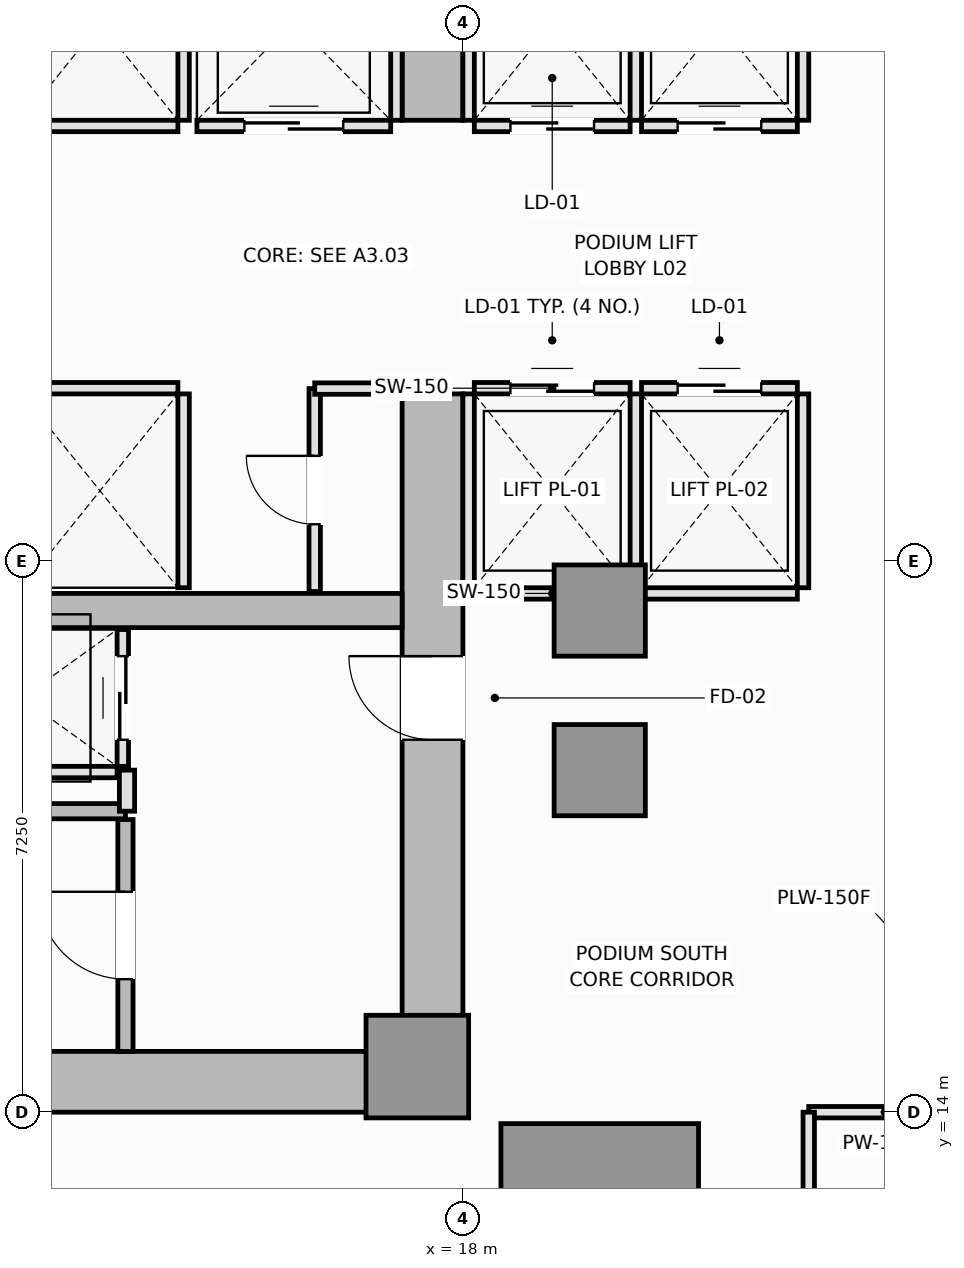
"""IFC4 building model, lengths in metres.
Left out: names, types, materials, properties, quantities, classifications, styles, units other than length and angle.
Written with IfcOpenShell. Run it as: python <this file> out.ifc"""

import sys

from ifc_helpers import new_model, si_unit, direction, frame, frame_2d, origin, origin_2d, place, context, subcontext, project, spatial, rectangle, extrude, element, fill, save


model = new_model("IFC4")
c1 = context("Model", 3, precision=1e-05, world=origin(), true_north=direction((0.0, 1.0)))
c2 = subcontext(c1, "Body", "Model", "MODEL_VIEW")
j1 = project(units=[si_unit("LENGTHUNIT", "METRE"), si_unit("PLANEANGLEUNIT", "RADIAN")], contexts=[c1])
p1 = place(None, origin())
s1 = spatial("IfcSite", under=j1, at=p1, CompositionType="ELEMENT")
p2 = place(p1, origin())
s2 = spatial("IfcBuilding", under=s1, at=p2, CompositionType="ELEMENT")
p3 = place(p2, frame((0.0, 0.0, 10.8)))
s3 = spatial("IfcBuildingStorey", under=s2, at=p3, CompositionType="ELEMENT", Elevation=10.8)
p4 = place(p3, frame((4.5, 14.4, 0.0), z_axis=(0.0, 0.0, 1.0), x_axis=(1.0, 0.0, 0.0)))
e1 = element("IfcWall", 1, at=p4, inside=s3, PredefinedType="SHEAR", context=c2, shape_type="SweptSolid", body=[
    extrude(rectangle(XDim=13.5, YDim=0.8, at=frame_2d((6.75, 0.0))), origin(), (0.0, 0.0, 1.0), 4.8),
])
p5 = place(p3, frame((17.6, 14.8, 0.0), z_axis=(0.0, 0.0, 1.0), x_axis=(0.0, 1.0, 0.0)))
e2 = element("IfcWall", 2, at=p5, inside=s3, PredefinedType="SHEAR", context=c2, shape_type="SweptSolid", body=[
    extrude(rectangle(XDim=8.65, YDim=0.8, at=frame_2d((4.325, 0.0))), origin(), (0.0, 0.0, 1.0), 4.8),
])
p6 = place(p5, frame((4.1, 0.0, 0.0)))
e3 = element("IfcOpeningElement", 3, at=p6, cuts=e2, PredefinedType="OPENING", context=c2, shape_type="SweptSolid", body=[
    extrude(rectangle(XDim=1.1, YDim=2.15, at=frame_2d((0.55, 1.075))), frame((0.0, 0.41, 0.0), z_axis=(0.0, -1.0, 0.0), x_axis=(1.0, 0.0, 0.0)), (0.0, 0.0, 1.0), 0.82),
])
p7 = place(p3, frame((17.6, 27.05, 0.0), z_axis=(0.0, 0.0, 1.0), x_axis=(0.0, 1.0, 0.0)))
e4 = element("IfcWall", 4, at=p7, inside=s3, PredefinedType="SHEAR", context=c2, shape_type="SweptSolid", body=[
    extrude(rectangle(XDim=8.65, YDim=0.8, at=frame_2d((4.325, 0.0))), origin(), (0.0, 0.0, 1.0), 4.8),
])
p8 = place(p7, frame((3.45, 0.0, 0.0)))
e5 = element("IfcOpeningElement", 5, at=p8, cuts=e4, PredefinedType="OPENING", context=c2, shape_type="SweptSolid", body=[
    extrude(rectangle(XDim=1.1, YDim=2.15, at=frame_2d((0.55, 1.075))), frame((0.0, 0.41, 0.0), z_axis=(0.0, -1.0, 0.0), x_axis=(1.0, 0.0, 0.0)), (0.0, 0.0, 1.0), 0.82),
])
p9 = place(p3, frame((5.3, 20.6, 0.0), z_axis=(0.0, 0.0, 1.0), x_axis=(1.0, 0.0, 0.0)))
e6 = element("IfcWall", 6, at=p9, inside=s3, PredefinedType="SHEAR", context=c2, shape_type="SweptSolid", body=[
    extrude(rectangle(XDim=11.9, YDim=0.45, at=frame_2d((5.95, 0.0))), origin(), (0.0, 0.0, 1.0), 4.8),
])
p10 = place(p3, frame((17.4, 14.6, 0.0), z_axis=(0.0, 0.0, 1.0), x_axis=(1.0, 0.0, 0.0)))
e7 = element("IfcColumn", 7, at=p10, inside=s3, PredefinedType="PILASTER", context=c2, shape_type="SweptSolid", body=[
    extrude(rectangle(XDim=1.35, YDim=1.35, at=origin_2d()), origin(), (0.0, 0.0, 1.0), 4.8),
])
p11 = place(p3, frame((19.8, 12.75, 0.0), z_axis=(0.0, 0.0, 1.0), x_axis=(1.0, 0.0, 0.0)))
e8 = element("IfcColumn", 8, at=p11, inside=s3, PredefinedType="COLUMN", context=c2, shape_type="SweptSolid", body=[
    extrude(rectangle(XDim=2.6, YDim=2.2, at=origin_2d()), origin(), (0.0, 0.0, 1.0), 4.8),
])
for number, where, z_axis, x_axis in (
    (9, (19.8, 18.5, 0.0), (0.0, 0.0, 1.0), (1.0, 0.0, 0.0)),
    (10, (19.8, 20.6, 0.0), (0.0, 0.0, 1.0), (1.0, 0.0, 0.0)),
):
    element("IfcColumn", number, at=place(p3, frame(where, z_axis=z_axis, x_axis=x_axis)), inside=s3, PredefinedType="COLUMN", context=c2, shape_type="SweptSolid", body=[
        extrude(rectangle(XDim=1.2, YDim=1.2, at=origin_2d()), origin(), (0.0, 0.0, 1.0), 4.8),
    ])
p12 = place(p3, frame((5.9, 17.96, 0.0), z_axis=(0.0, 0.0, 1.0), x_axis=(1.0, 0.0, 0.0)))
e11 = element("IfcWall", 11, at=p12, inside=s3, PredefinedType="SOLIDWALL", context=c2, shape_type="SweptSolid", body=[
    extrude(rectangle(XDim=7.66, YDim=0.2, at=frame_2d((3.83, 0.0))), origin(), (0.0, 0.0, 1.0), 4.8),
])
p13 = place(p3, frame((13.56, 14.8, 0.0), z_axis=(0.0, 0.0, 1.0), x_axis=(0.0, 1.0, 0.0)))
e12 = element("IfcWall", 12, at=p13, inside=s3, PredefinedType="SOLIDWALL", context=c2, shape_type="SweptSolid", body=[
    extrude(rectangle(XDim=3.05, YDim=0.2, at=frame_2d((1.525, 0.0))), origin(), (0.0, 0.0, 1.0), 4.8),
])
p14 = place(p13, frame((0.95, 0.0, 0.0)))
e13 = element("IfcOpeningElement", 13, at=p14, cuts=e12, PredefinedType="OPENING", context=c2, shape_type="SweptSolid", body=[
    extrude(rectangle(XDim=1.15, YDim=2.15, at=frame_2d((0.575, 1.075))), frame((0.0, 0.11, 0.0), z_axis=(0.0, -1.0, 0.0), x_axis=(1.0, 0.0, 0.0)), (0.0, 0.0, 1.0), 0.22),
])
p15 = place(p3, frame((18.15, 20.825, 0.0), z_axis=(0.0, 0.0, 1.0), x_axis=(1.0, 0.0, 0.0)))
e14 = element("IfcWall", 14, at=p15, inside=s3, PredefinedType="PARTITIONING", context=c2, shape_type="SweptSolid", body=[
    extrude(rectangle(XDim=2.05, YDim=0.15, at=frame_2d((1.025, 0.0))), origin(), (0.0, 0.0, 1.0), 4.6),
])
p16 = place(p3, frame((18.15, 23.525, 0.0), z_axis=(0.0, 0.0, 1.0), x_axis=(1.0, 0.0, 0.0)))
e15 = element("IfcWall", 15, at=p16, inside=s3, PredefinedType="PARTITIONING", context=c2, shape_type="SweptSolid", body=[
    extrude(rectangle(XDim=2.05, YDim=0.15, at=frame_2d((1.025, 0.0))), origin(), (0.0, 0.0, 1.0), 4.6),
])
p17 = place(p16, frame((0.475, 0.0, 0.0)))
e16 = element("IfcOpeningElement", 16, at=p17, cuts=e15, PredefinedType="OPENING", context=c2, shape_type="SweptSolid", body=[
    extrude(rectangle(XDim=1.1, YDim=2.2, at=frame_2d((0.55, 1.1))), frame((0.0, 0.085, 0.0), z_axis=(0.0, -1.0, 0.0), x_axis=(1.0, 0.0, 0.0)), (0.0, 0.0, 1.0), 0.17),
])
for number, where, z_axis, x_axis in (
    (17, (18.075, 20.9, 0.0), (0.0, 0.0, 1.0), (0.0, 1.0, 0.0)),
    (18, (20.275, 20.9, 0.0), (0.0, 0.0, 1.0), (0.0, 1.0, 0.0)),
):
    element("IfcWall", number, at=place(p3, frame(where, z_axis=z_axis, x_axis=x_axis)), inside=s3, PredefinedType="PARTITIONING", context=c2, shape_type="SweptSolid", body=[
        extrude(rectangle(XDim=2.55, YDim=0.15, at=frame_2d((1.275, 0.0))), origin(), (0.0, 0.0, 1.0), 4.6),
    ])
p18 = place(p3, frame((20.35, 20.825, 0.0), z_axis=(0.0, 0.0, 1.0), x_axis=(1.0, 0.0, 0.0)))
e19 = element("IfcWall", 19, at=p18, inside=s3, PredefinedType="PARTITIONING", context=c2, shape_type="SweptSolid", body=[
    extrude(rectangle(XDim=2.05, YDim=0.15, at=frame_2d((1.025, 0.0))), origin(), (0.0, 0.0, 1.0), 4.6),
])
p19 = place(p3, frame((20.35, 23.525, 0.0), z_axis=(0.0, 0.0, 1.0), x_axis=(1.0, 0.0, 0.0)))
e20 = element("IfcWall", 20, at=p19, inside=s3, PredefinedType="PARTITIONING", context=c2, shape_type="SweptSolid", body=[
    extrude(rectangle(XDim=2.05, YDim=0.15, at=frame_2d((1.025, 0.0))), origin(), (0.0, 0.0, 1.0), 4.6),
])
p20 = place(p19, frame((0.475, 0.0, 0.0)))
e21 = element("IfcOpeningElement", 21, at=p20, cuts=e20, PredefinedType="OPENING", context=c2, shape_type="SweptSolid", body=[
    extrude(rectangle(XDim=1.1, YDim=2.2, at=frame_2d((0.55, 1.1))), frame((0.0, 0.085, 0.0), z_axis=(0.0, -1.0, 0.0), x_axis=(1.0, 0.0, 0.0)), (0.0, 0.0, 1.0), 0.17),
])
p21 = place(p3, frame((22.475, 20.9, 0.0), z_axis=(0.0, 0.0, 1.0), x_axis=(0.0, 1.0, 0.0)))
e22 = element("IfcWall", 22, at=p21, inside=s3, PredefinedType="PARTITIONING", context=c2, shape_type="SweptSolid", body=[
    extrude(rectangle(XDim=2.55, YDim=0.15, at=frame_2d((1.275, 0.0))), origin(), (0.0, 0.0, 1.0), 4.6),
])
p22 = place(p3, frame((18.15, 26.975, 0.0), z_axis=(0.0, 0.0, 1.0), x_axis=(1.0, 0.0, 0.0)))
e23 = element("IfcWall", 23, at=p22, inside=s3, PredefinedType="PARTITIONING", context=c2, shape_type="SweptSolid", body=[
    extrude(rectangle(XDim=2.05, YDim=0.15, at=frame_2d((1.025, 0.0))), origin(), (0.0, 0.0, 1.0), 4.6),
])
p23 = place(p22, frame((0.475, 0.0, 0.0)))
e24 = element("IfcOpeningElement", 24, at=p23, cuts=e23, PredefinedType="OPENING", context=c2, shape_type="SweptSolid", body=[
    extrude(rectangle(XDim=1.1, YDim=2.2, at=frame_2d((0.55, 1.1))), frame((0.0, 0.085, 0.0), z_axis=(0.0, -1.0, 0.0), x_axis=(1.0, 0.0, 0.0)), (0.0, 0.0, 1.0), 0.17),
])
for number, where, z_axis, x_axis in (
    (25, (18.075, 27.05, 0.0), (0.0, 0.0, 1.0), (0.0, 1.0, 0.0)),
    (26, (20.275, 27.05, 0.0), (0.0, 0.0, 1.0), (0.0, 1.0, 0.0)),
):
    element("IfcWall", number, at=place(p3, frame(where, z_axis=z_axis, x_axis=x_axis)), inside=s3, PredefinedType="PARTITIONING", context=c2, shape_type="SweptSolid", body=[
        extrude(rectangle(XDim=2.55, YDim=0.15, at=frame_2d((1.275, 0.0))), origin(), (0.0, 0.0, 1.0), 4.6),
    ])
p24 = place(p3, frame((20.35, 26.975, 0.0), z_axis=(0.0, 0.0, 1.0), x_axis=(1.0, 0.0, 0.0)))
e27 = element("IfcWall", 27, at=p24, inside=s3, PredefinedType="PARTITIONING", context=c2, shape_type="SweptSolid", body=[
    extrude(rectangle(XDim=2.05, YDim=0.15, at=frame_2d((1.025, 0.0))), origin(), (0.0, 0.0, 1.0), 4.6),
])
p25 = place(p24, frame((0.475, 0.0, 0.0)))
e28 = element("IfcOpeningElement", 28, at=p25, cuts=e27, PredefinedType="OPENING", context=c2, shape_type="SweptSolid", body=[
    extrude(rectangle(XDim=1.1, YDim=2.2, at=frame_2d((0.55, 1.1))), frame((0.0, 0.085, 0.0), z_axis=(0.0, -1.0, 0.0), x_axis=(1.0, 0.0, 0.0)), (0.0, 0.0, 1.0), 0.17),
])
p26 = place(p3, frame((22.475, 27.05, 0.0), z_axis=(0.0, 0.0, 1.0), x_axis=(0.0, 1.0, 0.0)))
e29 = element("IfcWall", 29, at=p26, inside=s3, PredefinedType="PARTITIONING", context=c2, shape_type="SweptSolid", body=[
    extrude(rectangle(XDim=2.55, YDim=0.15, at=frame_2d((1.275, 0.0))), origin(), (0.0, 0.0, 1.0), 4.6),
])
p27 = place(p3, frame((12.2, 23.525, 0.0), z_axis=(0.0, 0.0, 1.0), x_axis=(1.0, 0.0, 0.0)))
e30 = element("IfcWall", 30, at=p27, inside=s3, PredefinedType="PARTITIONING", context=c2, shape_type="SweptSolid", body=[
    extrude(rectangle(XDim=2.05, YDim=0.15, at=frame_2d((1.025, 0.0))), origin(), (0.0, 0.0, 1.0), 4.6),
])
p28 = place(p3, frame((14.325, 20.9, 0.0), z_axis=(0.0, 0.0, 1.0), x_axis=(0.0, 1.0, 0.0)))
e31 = element("IfcWall", 31, at=p28, inside=s3, PredefinedType="PARTITIONING", context=c2, shape_type="SweptSolid", body=[
    extrude(rectangle(XDim=2.55, YDim=0.15, at=frame_2d((1.275, 0.0))), origin(), (0.0, 0.0, 1.0), 4.6),
])
p29 = place(p3, frame((12.2, 26.975, 0.0), z_axis=(0.0, 0.0, 1.0), x_axis=(1.0, 0.0, 0.0)))
e32 = element("IfcWall", 32, at=p29, inside=s3, PredefinedType="PARTITIONING", context=c2, shape_type="SweptSolid", body=[
    extrude(rectangle(XDim=2.05, YDim=0.15, at=frame_2d((1.025, 0.0))), origin(), (0.0, 0.0, 1.0), 4.6),
])
p30 = place(p3, frame((14.325, 27.05, 0.0), z_axis=(0.0, 0.0, 1.0), x_axis=(0.0, 1.0, 0.0)))
e33 = element("IfcWall", 33, at=p30, inside=s3, PredefinedType="PARTITIONING", context=c2, shape_type="SweptSolid", body=[
    extrude(rectangle(XDim=2.55, YDim=0.15, at=frame_2d((1.275, 0.0))), origin(), (0.0, 0.0, 1.0), 4.6),
])
p31 = place(p3, frame((14.5, 26.975, 0.0), z_axis=(0.0, 0.0, 1.0), x_axis=(1.0, 0.0, 0.0)))
e34 = element("IfcWall", 34, at=p31, inside=s3, PredefinedType="PARTITIONING", context=c2, shape_type="SweptSolid", body=[
    extrude(rectangle(XDim=2.55, YDim=0.15, at=frame_2d((1.275, 0.0))), origin(), (0.0, 0.0, 1.0), 4.6),
])
p32 = place(p31, frame((0.625, 0.0, 0.0)))
e35 = element("IfcOpeningElement", 35, at=p32, cuts=e34, PredefinedType="OPENING", context=c2, shape_type="SweptSolid", body=[
    extrude(rectangle(XDim=1.3, YDim=2.2, at=frame_2d((0.65, 1.1))), frame((0.0, 0.085, 0.0), z_axis=(0.0, -1.0, 0.0), x_axis=(1.0, 0.0, 0.0)), (0.0, 0.0, 1.0), 0.17),
])
p33 = place(p3, frame((17.125, 27.05, 0.0), z_axis=(0.0, 0.0, 1.0), x_axis=(0.0, 1.0, 0.0)))
e36 = element("IfcWall", 36, at=p33, inside=s3, PredefinedType="PARTITIONING", context=c2, shape_type="SweptSolid", body=[
    extrude(rectangle(XDim=2.6, YDim=0.15, at=frame_2d((1.3, 0.0))), origin(), (0.0, 0.0, 1.0), 4.6),
])
p34 = place(p3, frame((10.95, 18.475, 0.0), z_axis=(0.0, 0.0, 1.0), x_axis=(1.0, 0.0, 0.0)))
e37 = element("IfcWall", 37, at=p34, inside=s3, PredefinedType="PARTITIONING", context=c2, shape_type="SweptSolid", body=[
    extrude(rectangle(XDim=2.5, YDim=0.15, at=frame_2d((1.25, 0.0))), origin(), (0.0, 0.0, 1.0), 4.6),
])
p35 = place(p3, frame((13.525, 18.55, 0.0), z_axis=(0.0, 0.0, 1.0), x_axis=(0.0, 1.0, 0.0)))
e38 = element("IfcWall", 38, at=p35, inside=s3, PredefinedType="PARTITIONING", context=c2, shape_type="SweptSolid", body=[
    extrude(rectangle(XDim=1.8, YDim=0.15, at=frame_2d((0.9, 0.0))), origin(), (0.0, 0.0, 1.0), 4.6),
])
p36 = place(p35, frame((0.35, 0.0, 0.0)))
e39 = element("IfcOpeningElement", 39, at=p36, cuts=e38, PredefinedType="OPENING", context=c2, shape_type="SweptSolid", body=[
    extrude(rectangle(XDim=1.1, YDim=2.2, at=frame_2d((0.55, 1.1))), frame((0.0, 0.085, 0.0), z_axis=(0.0, -1.0, 0.0), x_axis=(1.0, 0.0, 0.0)), (0.0, 0.0, 1.0), 0.17),
])
p37 = place(p3, frame((13.58, 17.96, 0.0), z_axis=(0.0, 0.0, 1.0), x_axis=(0.0, 1.0, 0.0)))
e40 = element("IfcWall", 40, at=p37, inside=s3, PredefinedType="PARTITIONING", context=c2, shape_type="SweptSolid", body=[
    extrude(rectangle(XDim=0.54, YDim=0.2, at=frame_2d((0.27, 0.0))), origin(), (0.0, 0.0, 1.0), 4.6),
])
p38 = place(p3, frame((16.05, 20.85, 0.0), z_axis=(0.0, 0.0, 1.0), x_axis=(0.0, 1.0, 0.0)))
e41 = element("IfcWall", 41, at=p38, inside=s3, PredefinedType="PARTITIONING", context=c2, shape_type="SweptSolid", body=[
    extrude(rectangle(XDim=2.67, YDim=0.15, at=frame_2d((1.335, 0.0))), origin(), (0.0, 0.0, 1.0), 4.6),
])
p39 = place(p38, frame((0.885, 0.0, 0.0)))
e42 = element("IfcOpeningElement", 42, at=p39, cuts=e41, PredefinedType="OPENING", context=c2, shape_type="SweptSolid", body=[
    extrude(rectangle(XDim=0.9, YDim=2.1, at=frame_2d((0.45, 1.05))), frame((0.0, 0.085, 0.0), z_axis=(0.0, -1.0, 0.0), x_axis=(1.0, 0.0, 0.0)), (0.0, 0.0, 1.0), 0.17),
])
p40 = place(p3, frame((16.05, 23.52, 0.0), z_axis=(0.0, 0.0, 1.0), x_axis=(1.0, 0.0, 0.0)))
e43 = element("IfcWall", 43, at=p40, inside=s3, PredefinedType="PARTITIONING", context=c2, shape_type="SweptSolid", body=[
    extrude(rectangle(XDim=1.17, YDim=0.15, at=frame_2d((0.585, 0.0))), origin(), (0.0, 0.0, 1.0), 4.6),
])
p41 = place(p3, frame((22.55, 14.0, 0.0), z_axis=(0.0, 0.0, 1.0), x_axis=(1.0, 0.0, 0.0)))
e44 = element("IfcWall", 44, at=p41, inside=s3, PredefinedType="PARTITIONING", context=c2, shape_type="SweptSolid", body=[
    extrude(rectangle(XDim=2.0, YDim=0.15, at=frame_2d((1.0, 0.0))), origin(), (0.0, 0.0, 1.0), 4.6),
])
p42 = place(p3, frame((22.55, 11.75, 0.0), z_axis=(0.0, 0.0, 1.0), x_axis=(0.0, 1.0, 0.0)))
e45 = element("IfcWall", 45, at=p42, inside=s3, PredefinedType="PARTITIONING", context=c2, shape_type="SweptSolid", body=[
    extrude(rectangle(XDim=2.25, YDim=0.15, at=frame_2d((1.125, 0.0))), origin(), (0.0, 0.0, 1.0), 4.6),
])
p43 = place(p14, origin())
e46 = element("IfcDoor", 46, at=p43, inside=s3, OperationType="SINGLE_SWING_RIGHT", PredefinedType="DOOR", context=c2, shape_type="SweptSolid", body=[
    extrude(rectangle(XDim=1.15, YDim=2.15, at=frame_2d((0.575, 1.075))), frame((0.0, 0.025, 0.0), z_axis=(0.0, -1.0, 0.0), x_axis=(1.0, 0.0, 0.0)), (0.0, 0.0, 1.0), 0.05),
])
fill(e13, e46)
p44 = place(p17, origin())
e47 = element("IfcDoor", 47, at=p44, inside=s3, OperationType="DOUBLE_DOOR_SLIDING", PredefinedType="DOOR", context=c2, shape_type="SweptSolid", body=[
    extrude(rectangle(XDim=1.1, YDim=2.2, at=frame_2d((0.55, 1.1))), frame((0.0, 0.025, 0.0), z_axis=(0.0, -1.0, 0.0), x_axis=(1.0, 0.0, 0.0)), (0.0, 0.0, 1.0), 0.05),
])
fill(e16, e47)
p45 = place(p20, origin())
e48 = element("IfcDoor", 48, at=p45, inside=s3, OperationType="DOUBLE_DOOR_SLIDING", PredefinedType="DOOR", context=c2, shape_type="SweptSolid", body=[
    extrude(rectangle(XDim=1.1, YDim=2.2, at=frame_2d((0.55, 1.1))), frame((0.0, 0.025, 0.0), z_axis=(0.0, -1.0, 0.0), x_axis=(1.0, 0.0, 0.0)), (0.0, 0.0, 1.0), 0.05),
])
fill(e21, e48)
p46 = place(p23, origin())
e49 = element("IfcDoor", 49, at=p46, inside=s3, OperationType="DOUBLE_DOOR_SLIDING", PredefinedType="DOOR", context=c2, shape_type="SweptSolid", body=[
    extrude(rectangle(XDim=1.1, YDim=2.2, at=frame_2d((0.55, 1.1))), frame((0.0, 0.025, 0.0), z_axis=(0.0, -1.0, 0.0), x_axis=(1.0, 0.0, 0.0)), (0.0, 0.0, 1.0), 0.05),
])
fill(e24, e49)
p47 = place(p25, origin())
e50 = element("IfcDoor", 50, at=p47, inside=s3, OperationType="DOUBLE_DOOR_SLIDING", PredefinedType="DOOR", context=c2, shape_type="SweptSolid", body=[
    extrude(rectangle(XDim=1.1, YDim=2.2, at=frame_2d((0.55, 1.1))), frame((0.0, 0.025, 0.0), z_axis=(0.0, -1.0, 0.0), x_axis=(1.0, 0.0, 0.0)), (0.0, 0.0, 1.0), 0.05),
])
fill(e28, e50)
p48 = place(p32, origin())
e51 = element("IfcDoor", 51, at=p48, inside=s3, OperationType="DOUBLE_DOOR_SLIDING", PredefinedType="DOOR", context=c2, shape_type="SweptSolid", body=[
    extrude(rectangle(XDim=1.3, YDim=2.2, at=frame_2d((0.65, 1.1))), frame((0.0, 0.025, 0.0), z_axis=(0.0, -1.0, 0.0), x_axis=(1.0, 0.0, 0.0)), (0.0, 0.0, 1.0), 0.05),
])
fill(e35, e51)
p49 = place(p36, origin())
e52 = element("IfcDoor", 52, at=p49, inside=s3, OperationType="DOUBLE_DOOR_SLIDING", PredefinedType="DOOR", context=c2, shape_type="SweptSolid", body=[
    extrude(rectangle(XDim=1.1, YDim=2.2, at=frame_2d((0.55, 1.1))), frame((0.0, 0.025, 0.0), z_axis=(0.0, -1.0, 0.0), x_axis=(1.0, 0.0, 0.0)), (0.0, 0.0, 1.0), 0.05),
])
fill(e39, e52)
p50 = place(p6, origin())
e53 = element("IfcDoor", 53, at=p50, inside=s3, OperationType="SINGLE_SWING_RIGHT", PredefinedType="DOOR", context=c2, shape_type="SweptSolid", body=[
    extrude(rectangle(XDim=1.1, YDim=2.15, at=frame_2d((0.55, 1.075))), frame((0.0, 0.025, 0.0), z_axis=(0.0, -1.0, 0.0), x_axis=(1.0, 0.0, 0.0)), (0.0, 0.0, 1.0), 0.05),
])
fill(e3, e53)
p51 = place(p39, origin())
e54 = element("IfcDoor", 54, at=p51, inside=s3, OperationType="SINGLE_SWING_RIGHT", PredefinedType="DOOR", context=c2, shape_type="SweptSolid", body=[
    extrude(rectangle(XDim=0.9, YDim=2.1, at=frame_2d((0.45, 1.05))), frame((0.0, 0.025, 0.0), z_axis=(0.0, -1.0, 0.0), x_axis=(1.0, 0.0, 0.0)), (0.0, 0.0, 1.0), 0.05),
])
fill(e42, e54)
save(model, sys.argv[1])
